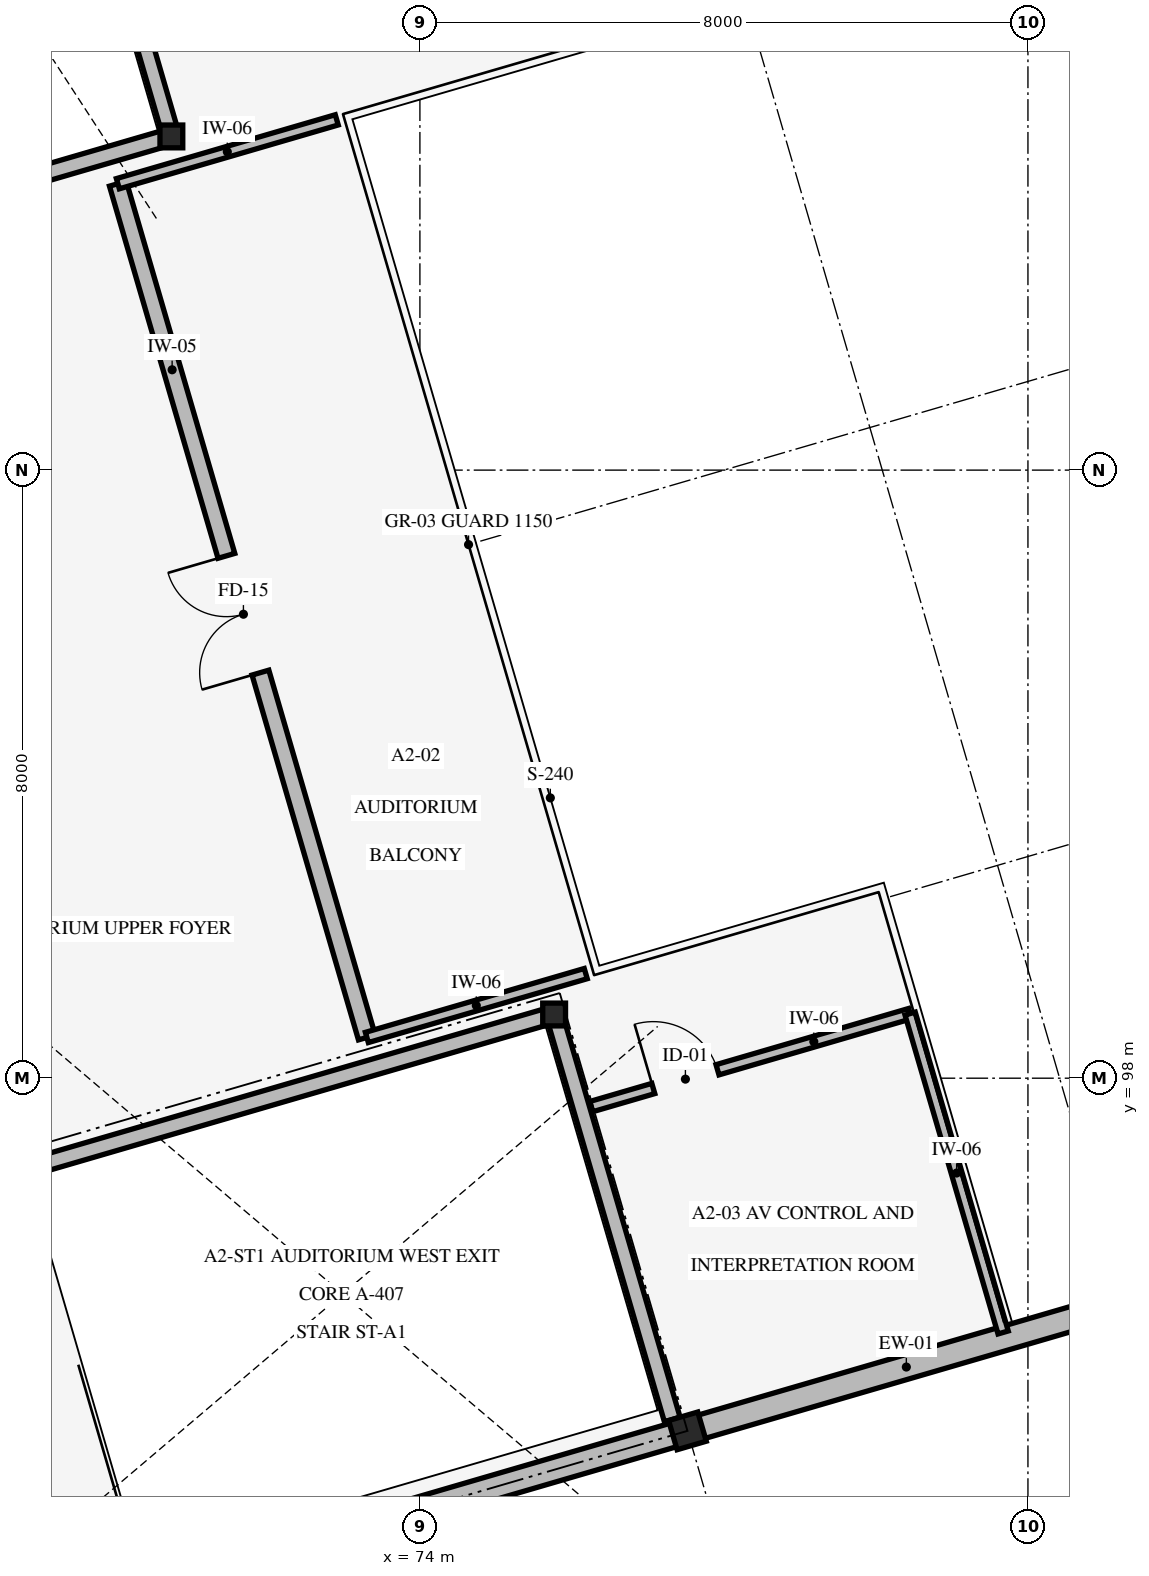
"""IFC4 building model, lengths in metres.
Left out: names, types, materials, properties, quantities, classifications, styles, units other than length and angle.
Written with IfcOpenShell. Run it as: python <this file> out.ifc"""

import sys

from ifc_helpers import new_model, si_unit, direction, frame, frame_2d, origin, origin_2d, place, context, subcontext, project, spatial, rectangle, i_section, extrude, element, fill, save


model = new_model("IFC4")
c1 = context("Model", 3, precision=1e-05, world=origin(), true_north=direction((0.0, 1.0)))
c2 = subcontext(c1, "Body", "Model", "MODEL_VIEW")
j1 = project(units=[si_unit("LENGTHUNIT", "METRE"), si_unit("PLANEANGLEUNIT", "RADIAN")], contexts=[c1])
p1 = place(None, origin())
s1 = spatial("IfcSite", under=j1, at=p1, CompositionType="ELEMENT")
p2 = place(p1, origin())
s2 = spatial("IfcBuilding", under=s1, at=p2, CompositionType="ELEMENT")
p3 = place(p2, frame((0.0, 0.0, 5.4)))
s3 = spatial("IfcBuildingStorey", under=s2, at=p3, CompositionType="ELEMENT", Elevation=5.4)
for number, where, z_axis, x_axis in (
    (1, (75.766, 98.838, 0.0), (0.0, 0.0, 1.0), (1.0, 0.0, 0.0)),
    (2, (70.73, 110.39, 0.0), (0.0, 0.0, 1.0), (1.0, 0.0, 0.0)),
):
    element("IfcColumn", number, at=place(p3, frame(where, z_axis=z_axis, x_axis=x_axis)), inside=s3, PredefinedType="COLUMN", context=c2, shape_type="SweptSolid", body=[
        extrude(i_section(OverallWidth=0.3, OverallDepth=0.3, WebThickness=0.01, FlangeThickness=0.015, FilletRadius=0.018, at=origin_2d()), origin(), (0.0, 0.0, 1.0), 4.62),
    ])
p4 = place(p3, frame((77.52, 93.36, 0.0), z_axis=(0.0, 0.0, 1.0), x_axis=(0.960000000041, 0.279999999861, 0.0)))
e3 = element("IfcColumn", 3, at=p4, inside=s3, PredefinedType="COLUMN", context=c2, shape_type="SweptSolid", body=[
    extrude(i_section(OverallWidth=0.4, OverallDepth=0.4, WebThickness=0.013, FlangeThickness=0.021, FilletRadius=0.022, at=origin_2d()), origin(), (0.0, 0.0, 1.0), 10.22),
])
for number, where, z_axis, x_axis in (
    (4, (77.52, 93.36, 0.0), (0.0, 0.0, 1.0), (-0.96, -0.28, 0.0)),
    (5, (83.28, 95.04, 0.0), (0.0, 0.0, 1.0), (-0.96, -0.28, 0.0)),
):
    element("IfcWall", number, at=place(p3, frame(where, z_axis=z_axis, x_axis=x_axis)), inside=s3, PredefinedType="STANDARD", context=c2, shape_type="SweptSolid", body=[
        extrude(rectangle(XDim=6.0, YDim=0.32, at=frame_2d((3.0, 0.0))), origin(), (0.0, 0.0, 1.0), 9.7),
    ])
p5 = place(p3, frame((66.262, 96.066, 0.0), z_axis=(0.0, 0.0, 1.0), x_axis=(0.960001933347, 0.279993371297, 0.0)))
e6 = element("IfcWall", 6, at=p5, inside=s3, PredefinedType="STANDARD", context=c2, shape_type="SweptSolid", body=[
    extrude(rectangle(XDim=9.9, YDim=0.215, at=frame_2d((4.95, 0.0))), origin(), (0.0, 0.0, 1.0), 4.5),
])
p6 = place(p5, frame((0.55, 0.0, 0.0)))
e7 = element("IfcOpeningElement", 7, at=p6, cuts=e6, PredefinedType="OPENING", context=c2, shape_type="SweptSolid", body=[
    extrude(rectangle(XDim=1.2, YDim=2.1, at=frame_2d((0.6, 1.05))), frame((0.0, 0.118, 0.0), z_axis=(0.0, -1.0, 0.0), x_axis=(1.0, 0.0, 0.0)), (0.0, 0.0, 1.0), 0.235),
])
p7 = place(p3, frame((77.32, 93.51, 0.0), z_axis=(0.0, 0.0, 1.0), x_axis=(-0.279998310772, 0.96000049269, 0.0)))
e8 = element("IfcWall", 8, at=p7, inside=s3, PredefinedType="STANDARD", context=c2, shape_type="SweptSolid", body=[
    extrude(rectangle(XDim=5.55, YDim=0.215, at=frame_2d((2.775, 0.0))), origin(), (0.0, 0.0, 1.0), 4.5),
])
p8 = place(p3, frame((61.082, 107.576, 0.0), z_axis=(0.0, 0.0, 1.0), x_axis=(0.960000544156, 0.279998134317, 0.0)))
e9 = element("IfcWall", 9, at=p8, inside=s3, PredefinedType="STANDARD", context=c2, shape_type="SweptSolid", body=[
    extrude(rectangle(XDim=10.05, YDim=0.215, at=frame_2d((5.025, 0.0))), origin(), (0.0, 0.0, 1.0), 4.5),
])
p9 = place(p8, frame((1.35, 0.0, 0.0)))
e10 = element("IfcOpeningElement", 10, at=p9, cuts=e9, PredefinedType="OPENING", context=c2, shape_type="SweptSolid", body=[
    extrude(rectangle(XDim=1.4, YDim=2.2, at=frame_2d((0.7, 1.1))), frame((0.0, 0.118, 0.0), z_axis=(0.0, -1.0, 0.0), x_axis=(1.0, 0.0, 0.0)), (0.0, 0.0, 1.0), 0.235),
])
p10 = place(p3, frame((70.73, 110.39, 0.0), z_axis=(0.0, 0.0, 1.0), x_axis=(-0.27998648672, 0.96000394127, 0.0)))
e11 = element("IfcWall", 11, at=p10, inside=s3, PredefinedType="STANDARD", context=c2, shape_type="SweptSolid", body=[
    extrude(rectangle(XDim=5.55, YDim=0.215, at=frame_2d((2.775, 0.0))), origin(), (0.0, 0.0, 1.0), 4.5),
])
p11 = place(p3, frame((73.302, 98.536, 0.0), z_axis=(0.0, 0.0, 1.0), x_axis=(-0.280005608871, 0.959998364061, 0.0)))
e12 = element("IfcWall", 12, at=p11, inside=s3, PredefinedType="STANDARD", context=c2, shape_type="SweptSolid", body=[
    extrude(rectangle(XDim=11.7, YDim=0.23, at=frame_2d((5.85, 0.0))), origin(), (0.0, 0.0, 1.0), 4.5),
])
p12 = place(p11, frame((5.0, 0.0, 0.0)))
e13 = element("IfcOpeningElement", 13, at=p12, cuts=e12, PredefinedType="OPENING", context=c2, shape_type="SweptSolid", body=[
    extrude(rectangle(XDim=1.6, YDim=2.25, at=frame_2d((0.8, 1.125))), frame((0.0, 0.125, 0.0), z_axis=(0.0, -1.0, 0.0), x_axis=(1.0, 0.0, 0.0)), (0.0, 0.0, 1.0), 0.25),
])
for number, where, z_axis, x_axis in (
    (14, (73.302, 98.536, 0.0), (0.0, 0.0, 1.0), (0.96, 0.28, 0.0)),
    (15, (70.026, 109.768, 0.0), (0.0, 0.0, 1.0), (0.96, 0.28, 0.0)),
):
    element("IfcWall", number, at=place(p3, frame(where, z_axis=z_axis, x_axis=x_axis)), inside=s3, PredefinedType="STANDARD", context=c2, shape_type="SweptSolid", body=[
        extrude(rectangle(XDim=3.0, YDim=0.14, at=frame_2d((1.5, 0.0))), origin(), (0.0, 0.0, 1.0), 4.5),
    ])
p13 = place(p3, frame((76.255, 97.626, 0.0), z_axis=(0.0, 0.0, 1.0), x_axis=(0.959995619759, 0.280015017531, 0.0)))
e16 = element("IfcWall", 16, at=p13, inside=s3, PredefinedType="STANDARD", context=c2, shape_type="SweptSolid", body=[
    extrude(rectangle(XDim=4.37, YDim=0.14, at=frame_2d((2.185, 0.0))), origin(), (0.0, 0.0, 1.0), 4.5),
])
p14 = place(p13, frame((0.85, 0.0, 0.0)))
e17 = element("IfcOpeningElement", 17, at=p14, cuts=e16, PredefinedType="OPENING", context=c2, shape_type="SweptSolid", body=[
    extrude(rectangle(XDim=0.88, YDim=2.05, at=frame_2d((0.44, 1.025))), frame((0.0, 0.08, 0.0), z_axis=(0.0, -1.0, 0.0), x_axis=(1.0, 0.0, 0.0)), (0.0, 0.0, 1.0), 0.16),
])
p15 = place(p3, frame((81.674, 94.655, 0.0), z_axis=(0.0, 0.0, 1.0), x_axis=(-0.28, 0.96, 0.0)))
e18 = element("IfcWall", 18, at=p15, inside=s3, PredefinedType="STANDARD", context=c2, shape_type="SweptSolid", body=[
    extrude(rectangle(XDim=4.37, YDim=0.14, at=frame_2d((2.185, 0.0))), origin(), (0.0, 0.0, 1.0), 4.5),
])
p16 = place(p12, origin())
e19 = element("IfcDoor", 19, at=p16, inside=s3, OperationType="DOUBLE_DOOR_SINGLE_SWING", PredefinedType="DOOR", context=c2, shape_type="SweptSolid", body=[
    extrude(rectangle(XDim=1.6, YDim=2.25, at=frame_2d((0.8, 1.125))), frame((0.0, 0.025, 0.0), z_axis=(0.0, -1.0, 0.0), x_axis=(1.0, 0.0, 0.0)), (0.0, 0.0, 1.0), 0.05),
])
fill(e13, e19)
p17 = place(p14, origin())
e20 = element("IfcDoor", 20, at=p17, inside=s3, OperationType="SINGLE_SWING_LEFT", PredefinedType="DOOR", context=c2, shape_type="SweptSolid", body=[
    extrude(rectangle(XDim=0.88, YDim=2.05, at=frame_2d((0.44, 1.025))), frame((0.0, 0.025, 0.0), z_axis=(0.0, -1.0, 0.0), x_axis=(1.0, 0.0, 0.0)), (0.0, 0.0, 1.0), 0.05),
])
fill(e17, e20)
save(model, sys.argv[1])
